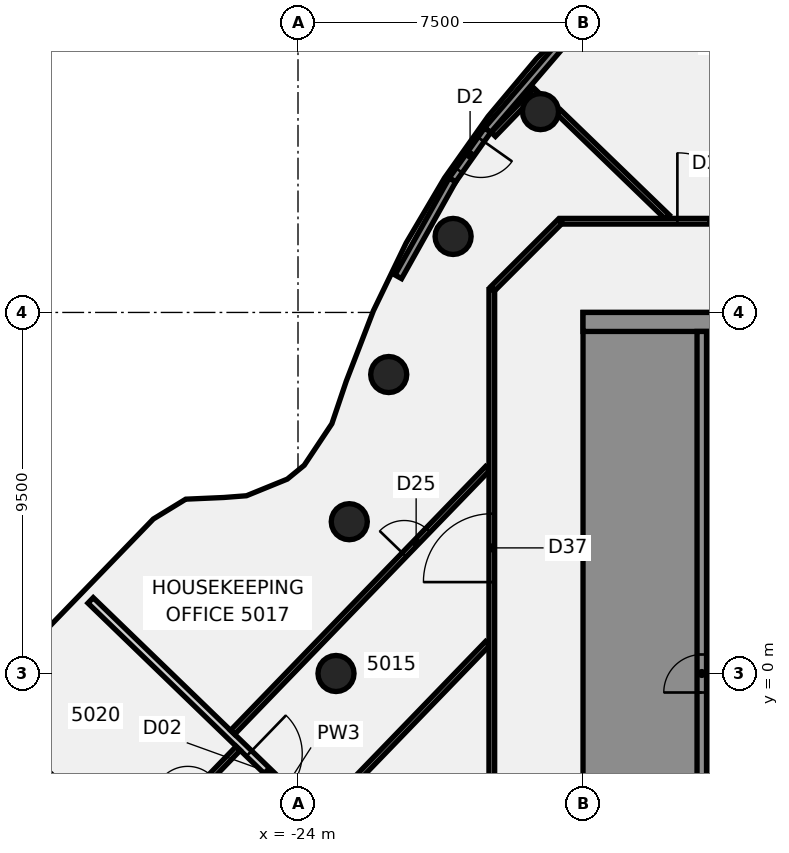
"""IFC4 building model, lengths in metres.
Left out: names, types, materials, properties, quantities, classifications, styles, units other than length and angle.
Written with IfcOpenShell. Run it as: python <this file> out.ifc"""

import sys

from ifc_helpers import new_model, si_unit, direction, frame, frame_2d, origin, origin_2d, place, context, subcontext, project, spatial, polyline, rectangle, circle, outline, extrude, element, fill, save


model = new_model("IFC4")
c1 = context("Model", 3, precision=1e-05, world=origin(), true_north=direction((0.0, 1.0)))
c2 = subcontext(c1, "Body", "Model", "MODEL_VIEW")
j1 = project(units=[si_unit("LENGTHUNIT", "METRE"), si_unit("PLANEANGLEUNIT", "RADIAN")], contexts=[c1])
p1 = place(None, origin())
s1 = spatial("IfcSite", under=j1, at=p1, CompositionType="ELEMENT")
p2 = place(p1, origin())
s2 = spatial("IfcBuilding", under=s1, at=p2, CompositionType="ELEMENT")
p3 = place(p2, frame((0.0, 0.0, 200.5)))
s3 = spatial("IfcBuildingStorey", under=s2, at=p3, CompositionType="ELEMENT", Elevation=200.5)
for number, where, z_axis, x_axis in (
    (1, (-17.619, 14.784, -0.14), (0.0, 0.0, 1.0), (1.0, 0.0, 0.0)),
    (2, (-19.919, 11.5, -0.14), (0.0, 0.0, 1.0), (1.0, 0.0, 0.0)),
    (3, (-21.613, 7.866, -0.14), (0.0, 0.0, 1.0), (1.0, 0.0, 0.0)),
    (4, (-22.651, 3.994, -0.14), (0.0, 0.0, 1.0), (1.0, 0.0, 0.0)),
    (5, (-23.0, 0.0, -0.14), (0.0, 0.0, 1.0), (1.0, 0.0, 0.0)),
):
    element("IfcColumn", number, at=place(p3, frame(where, z_axis=z_axis, x_axis=x_axis)), inside=s3, PredefinedType="COLUMN", context=c2, shape_type="SweptSolid", body=[
        extrude(circle(Radius=0.475, at=origin_2d()), origin(), (0.0, 0.0, 1.0), 3.6),
    ])
p4 = place(p3, frame((-29.458, 1.924, 0.0), z_axis=(0.0, 0.0, 1.0), x_axis=(0.719015546542, -0.694993988342, 0.0)))
e6 = element("IfcWall", 6, at=p4, inside=s3, PredefinedType="PARTITIONING", context=c2, shape_type="SweptSolid", body=[
    extrude(rectangle(XDim=14.219, YDim=0.2, at=frame_2d((7.109, 0.0))), origin(), (0.0, 0.0, 1.0), 2.864),
])
p5 = place(p4, frame((5.799, 0.0, 0.0)))
e7 = element("IfcOpeningElement", 7, at=p5, cuts=e6, PredefinedType="OPENING", context=c2, shape_type="SweptSolid", body=[
    extrude(rectangle(XDim=1.4, YDim=2.1, at=frame_2d((0.7, 1.05))), frame((0.0, 0.11, 0.0), z_axis=(0.0, -1.0, 0.0), x_axis=(1.0, 0.0, 0.0)), (0.0, 0.0, 1.0), 0.22),
])
p6 = place(p3, frame((-17.137, 14.771, 0.0), z_axis=(0.0, 0.0, 1.0), x_axis=(0.719023191533, -0.694986079025, 0.0)))
e8 = element("IfcWall", 8, at=p6, inside=s3, PredefinedType="PARTITIONING", context=c2, shape_type="SweptSolid", body=[
    extrude(rectangle(XDim=3.971, YDim=0.15, at=frame_2d((1.986, 0.0))), origin(), (0.0, 0.0, 1.0), 2.864),
])
p7 = place(p3, frame((-17.065, 11.9, 0.0), z_axis=(0.0, 0.0, 1.0), x_axis=(1.0, 0.0, 0.0)))
e9 = element("IfcWall", 9, at=p7, inside=s3, PredefinedType="PARTITIONING", context=c2, shape_type="SweptSolid", body=[
    extrude(rectangle(XDim=34.165, YDim=0.15, at=frame_2d((17.083, 0.0))), origin(), (0.0, 0.0, 1.0), 2.864),
])
p8 = place(p7, frame((24.372, 0.0, 0.0)))
e10 = element("IfcOpeningElement", 10, at=p8, cuts=e9, PredefinedType="OPENING", context=c2, shape_type="SweptSolid", body=[
    extrude(rectangle(XDim=1.8, YDim=2.1, at=frame_2d((0.9, 1.05))), frame((0.0, 0.085, 0.0), z_axis=(0.0, -1.0, 0.0), x_axis=(1.0, 0.0, 0.0)), (0.0, 0.0, 1.0), 0.17),
])
p9 = place(p7, frame((8.898, 0.0, 0.0)))
e11 = element("IfcOpeningElement", 11, at=p9, cuts=e9, PredefinedType="OPENING", context=c2, shape_type="SweptSolid", body=[
    extrude(rectangle(XDim=1.8, YDim=2.1, at=frame_2d((0.9, 1.05))), frame((0.0, 0.085, 0.0), z_axis=(0.0, -1.0, 0.0), x_axis=(1.0, 0.0, 0.0)), (0.0, 0.0, 1.0), 0.17),
])
p10 = place(p7, frame((3.048, 0.0, 0.0)))
e12 = element("IfcOpeningElement", 12, at=p10, cuts=e9, PredefinedType="OPENING", context=c2, shape_type="SweptSolid", body=[
    extrude(rectangle(XDim=1.8, YDim=2.1, at=frame_2d((0.9, 1.05))), frame((0.0, 0.085, 0.0), z_axis=(0.0, -1.0, 0.0), x_axis=(1.0, 0.0, 0.0)), (0.0, 0.0, 1.0), 0.17),
])
p11 = place(p3, frame((-18.872, 10.128, 0.0), z_axis=(0.0, 0.0, 1.0), x_axis=(0.707106781187, 0.707106781187, 0.0)))
e13 = element("IfcWall", 13, at=p11, inside=s3, PredefinedType="PARTITIONING", context=c2, shape_type="SweptSolid", body=[
    extrude(rectangle(XDim=2.505, YDim=0.15, at=frame_2d((1.253, 0.0))), origin(), (0.0, 0.0, 1.0), 2.864),
])
p12 = place(p3, frame((-28.256, -4.745, 0.0), z_axis=(0.0, 0.0, 1.0), x_axis=(0.69501991717, 0.718990483064, 0.0)))
e14 = element("IfcWall", 14, at=p12, inside=s3, PredefinedType="PARTITIONING", context=c2, shape_type="SweptSolid", body=[
    extrude(rectangle(XDim=3.86, YDim=0.15, at=frame_2d((1.93, 0.0))), origin(), (0.0, 0.0, 1.0), 2.864),
])
p13 = place(p12, frame((1.95, 0.0, 0.0)))
e15 = element("IfcOpeningElement", 15, at=p13, cuts=e14, PredefinedType="OPENING", context=c2, shape_type="SweptSolid", body=[
    extrude(rectangle(XDim=0.9, YDim=2.1, at=frame_2d((0.45, 1.05))), frame((0.0, 0.085, 0.0), z_axis=(0.0, -1.0, 0.0), x_axis=(1.0, 0.0, 0.0)), (0.0, 0.0, 1.0), 0.17),
])
p14 = place(p3, frame((-25.721, -1.548, 0.0), z_axis=(0.0, 0.0, 1.0), x_axis=(0.694993774498, 0.719015753241, 0.0)))
e16 = element("IfcWall", 16, at=p14, inside=s3, PredefinedType="PARTITIONING", context=c2, shape_type="SweptSolid", body=[
    extrude(rectangle(XDim=9.655, YDim=0.15, at=frame_2d((4.828, 0.0))), origin(), (0.0, 0.0, 1.0), 2.864),
])
p15 = place(p14, frame((6.5, 0.0, 0.0)))
e17 = element("IfcOpeningElement", 17, at=p15, cuts=e16, PredefinedType="OPENING", context=c2, shape_type="SweptSolid", body=[
    extrude(rectangle(XDim=0.9, YDim=2.1, at=frame_2d((0.45, 1.05))), frame((0.0, 0.085, 0.0), z_axis=(0.0, -1.0, 0.0), x_axis=(1.0, 0.0, 0.0)), (0.0, 0.0, 1.0), 0.17),
])
p16 = place(p3, frame((-23.408, -3.758, 0.0), z_axis=(0.0, 0.0, 1.0), x_axis=(0.69504071857, 0.718970374584, 0.0)))
e18 = element("IfcWall", 18, at=p16, inside=s3, PredefinedType="PARTITIONING", context=c2, shape_type="SweptSolid", body=[
    extrude(rectangle(XDim=6.325, YDim=0.15, at=frame_2d((3.163, 0.0))), origin(), (0.0, 0.0, 1.0), 2.864),
])
p17 = place(p3, frame((-18.859, 14.184, 0.0), z_axis=(0.0, 0.0, 1.0), x_axis=(0.695170193183, 0.718845186747, 0.0)))
e19 = element("IfcWall", 19, at=p17, inside=s3, PredefinedType="PARTITIONING", context=c2, shape_type="SweptSolid", body=[
    extrude(rectangle(XDim=1.619, YDim=0.15, at=frame_2d((0.81, 0.0))), origin(), (0.0, 0.0, 1.0), 2.864),
])
p18 = place(p3, frame((-18.9, -10.1, 0.0), z_axis=(0.0, 0.0, 1.0), x_axis=(0.0, 1.0, 0.0)))
e20 = element("IfcWall", 20, at=p18, inside=s3, PredefinedType="PARTITIONING", context=c2, shape_type="SweptSolid", body=[
    extrude(rectangle(XDim=20.2, YDim=0.15, at=frame_2d((10.1, 0.0))), origin(), (0.0, 0.0, 1.0), 2.864),
])
p19 = place(p18, frame((12.505, 0.0, 0.0)))
e21 = element("IfcOpeningElement", 21, at=p19, cuts=e20, PredefinedType="OPENING", context=c2, shape_type="SweptSolid", body=[
    extrude(rectangle(XDim=1.8, YDim=2.1, at=frame_2d((0.9, 1.05))), frame((0.0, 0.085, 0.0), z_axis=(0.0, -1.0, 0.0), x_axis=(1.0, 0.0, 0.0)), (0.0, 0.0, 1.0), 0.17),
])
p20 = place(p18, frame((5.072, 0.0, 0.0)))
e22 = element("IfcOpeningElement", 22, at=p20, cuts=e20, PredefinedType="OPENING", context=c2, shape_type="SweptSolid", body=[
    extrude(rectangle(XDim=0.9, YDim=2.1, at=frame_2d((0.45, 1.05))), frame((0.0, 0.085, 0.0), z_axis=(0.0, -1.0, 0.0), x_axis=(1.0, 0.0, 0.0)), (0.0, 0.0, 1.0), 0.17),
])
p21 = place(p3, frame((-17.106, 16.516, 0.0), z_axis=(0.0, 0.0, 1.0), x_axis=(-0.651107622301, -0.758985417635, 0.0)))
e23 = element("IfcWall", 23, at=p21, inside=s3, PredefinedType="SOLIDWALL", context=c2, shape_type="SweptSolid", body=[
    extrude(rectangle(XDim=2.924, YDim=0.2, at=frame_2d((1.462, 0.0))), origin(), (0.0, 0.0, 1.0), 3.46),
])
p22 = place(p3, frame((-19.934, 12.99, 0.0), z_axis=(0.0, 0.0, 1.0), x_axis=(-0.488305904859, -0.872672529234, 0.0)))
e24 = element("IfcWall", 24, at=p22, inside=s3, PredefinedType="SOLIDWALL", context=c2, shape_type="SweptSolid", body=[
    extrude(rectangle(XDim=2.924, YDim=0.2, at=frame_2d((1.462, 0.0))), origin(), (0.0, 0.0, 1.0), 3.46),
])
p23 = place(p3, frame((-19.01, 14.296, 0.0), z_axis=(0.0, 0.0, 1.0), x_axis=(-0.577623490405, -0.816303315767, 0.0)))
e25 = element("IfcWall", 25, at=p23, inside=s3, PredefinedType="SOLIDWALL", context=c2, shape_type="SweptSolid", body=[
    extrude(rectangle(XDim=1.6, YDim=0.2, at=frame_2d((0.8, 0.0))), origin(), (0.0, 0.0, 1.0), 3.46),
])
p24 = place(p23, frame((0.3, 0.0, 0.0)))
e26 = element("IfcOpeningElement", 26, at=p24, cuts=e25, PredefinedType="OPENING", context=c2, shape_type="SweptSolid", body=[
    extrude(rectangle(XDim=1.0, YDim=2.4, at=frame_2d((0.5, 1.2))), frame((0.0, 0.11, 0.0), z_axis=(0.0, -1.0, 0.0), x_axis=(1.0, 0.0, 0.0)), (0.0, 0.0, 1.0), 0.22),
])
p25 = place(p3, origin())
e27 = element("IfcWall", 27, at=p25, inside=s3, PredefinedType="SHEAR", context=c2, shape_type="SweptSolid", body=[
    extrude(outline(polyline([(-13.5, -8.125), (-16.0, -8.125), (-16.0, -5.625), (-13.5, -5.625), (-13.5, -5.375), (-16.0, -5.375), (-16.0, 5.375), (-13.5, 5.375), (-13.5, 5.625), (-16.0, 5.625), (-16.0, 8.125), (-13.5, 8.125), (-13.5, 9.0), (-16.0, 9.0), (-16.5, 9.0), (-16.5, -9.0), (-16.0, -9.0), (-13.5, -9.0), (-13.5, -8.125)])), origin(), (0.0, 0.0, 1.0), 3.46),
])
p26 = place(p3, frame((-16.5, 9.25, 0.0), z_axis=(0.0, 0.0, 1.0), x_axis=(1.0, 0.0, 0.0)))
e28 = element("IfcWall", 28, at=p26, inside=s3, PredefinedType="SHEAR", context=c2, shape_type="SweptSolid", body=[
    extrude(rectangle(XDim=13.0, YDim=0.5, at=frame_2d((6.5, 0.0))), origin(), (0.0, 0.0, 1.0), 3.46),
])
p27 = place(p3, frame((-13.375, -9.0, 0.0), z_axis=(0.0, 0.0, 1.0), x_axis=(0.0, 1.0, 0.0)))
e29 = element("IfcWall", 29, at=p27, inside=s3, PredefinedType="SHEAR", context=c2, shape_type="SweptSolid", body=[
    extrude(rectangle(XDim=18.0, YDim=0.25, at=frame_2d((9.0, 0.0))), origin(), (0.0, 0.0, 1.0), 3.46),
])
p28 = place(p27, frame((1.425, 0.0, 0.0)))
e30 = element("IfcOpeningElement", 30, at=p28, cuts=e29, PredefinedType="OPENING", context=c2, shape_type="SweptSolid", body=[
    extrude(rectangle(XDim=1.4, YDim=2.1, at=frame_2d((0.7, 1.05))), frame((0.0, 0.135, 0.0), z_axis=(0.0, -1.0, 0.0), x_axis=(1.0, 0.0, 0.0)), (0.0, 0.0, 1.0), 0.27),
])
p29 = place(p27, frame((8.5, 0.0, 0.0)))
e31 = element("IfcOpeningElement", 31, at=p29, cuts=e29, PredefinedType="OPENING", context=c2, shape_type="SweptSolid", body=[
    extrude(rectangle(XDim=1.0, YDim=2.1, at=frame_2d((0.5, 1.05))), frame((0.0, 0.135, 0.0), z_axis=(0.0, -1.0, 0.0), x_axis=(1.0, 0.0, 0.0)), (0.0, 0.0, 1.0), 0.27),
])
p30 = place(p3, frame((-30.798, -2.483, -0.14), z_axis=(0.0, 0.0, 1.0), x_axis=(0.718983292765, -0.695027355379, 0.0)))
e32 = element("IfcWall", 32, at=p30, inside=s3, PredefinedType="SHEAR", context=c2, shape_type="SweptSolid", body=[
    extrude(rectangle(XDim=3.2, YDim=0.2, at=frame_2d((1.6, 0.0))), origin(), (0.0, 0.0, 1.0), 3.004),
])
p31 = place(p5, origin())
e33 = element("IfcDoor", 33, at=p31, inside=s3, OperationType="DOUBLE_DOOR_SINGLE_SWING", PredefinedType="DOOR", context=c2, shape_type="SweptSolid", body=[
    extrude(rectangle(XDim=1.4, YDim=2.1, at=frame_2d((0.7, 1.05))), frame((0.0, 0.025, 0.0), z_axis=(0.0, -1.0, 0.0), x_axis=(1.0, 0.0, 0.0)), (0.0, 0.0, 1.0), 0.05),
])
fill(e7, e33)
p32 = place(p10, origin())
e34 = element("IfcDoor", 34, at=p32, inside=s3, OperationType="DOUBLE_DOOR_SINGLE_SWING", PredefinedType="DOOR", context=c2, shape_type="SweptSolid", body=[
    extrude(rectangle(XDim=1.8, YDim=2.1, at=frame_2d((0.9, 1.05))), frame((0.0, 0.025, 0.0), z_axis=(0.0, -1.0, 0.0), x_axis=(1.0, 0.0, 0.0)), (0.0, 0.0, 1.0), 0.05),
])
fill(e12, e34)
p33 = place(p15, origin())
e35 = element("IfcDoor", 35, at=p33, inside=s3, OperationType="SINGLE_SWING_LEFT", PredefinedType="DOOR", context=c2, shape_type="SweptSolid", body=[
    extrude(rectangle(XDim=0.9, YDim=2.1, at=frame_2d((0.45, 1.05))), frame((0.0, 0.025, 0.0), z_axis=(0.0, -1.0, 0.0), x_axis=(1.0, 0.0, 0.0)), (0.0, 0.0, 1.0), 0.05),
])
fill(e17, e35)
p34 = place(p19, frame((1.8, 0.0, 0.0), z_axis=(0.0, 0.0, 1.0), x_axis=(-1.0, 0.0, 0.0)))
e36 = element("IfcDoor", 36, at=p34, inside=s3, OperationType="DOUBLE_DOOR_SINGLE_SWING", PredefinedType="DOOR", context=c2, shape_type="SweptSolid", body=[
    extrude(rectangle(XDim=1.8, YDim=2.1, at=frame_2d((0.9, 1.05))), frame((0.0, 0.025, 0.0), z_axis=(0.0, -1.0, 0.0), x_axis=(1.0, 0.0, 0.0)), (0.0, 0.0, 1.0), 0.05),
])
fill(e21, e36)
p35 = place(p24, origin())
e37 = element("IfcDoor", 37, at=p35, inside=s3, OperationType="SINGLE_SWING_LEFT", PredefinedType="DOOR", context=c2, shape_type="SweptSolid", body=[
    extrude(rectangle(XDim=1.0, YDim=2.4, at=frame_2d((0.5, 1.2))), frame((0.0, 0.025, 0.0), z_axis=(0.0, -1.0, 0.0), x_axis=(1.0, 0.0, 0.0)), (0.0, 0.0, 1.0), 0.05),
])
fill(e26, e37)
p36 = place(p29, origin())
e38 = element("IfcDoor", 38, at=p36, inside=s3, OperationType="SINGLE_SWING_LEFT", PredefinedType="DOOR", context=c2, shape_type="SweptSolid", body=[
    extrude(rectangle(XDim=1.0, YDim=2.1, at=frame_2d((0.5, 1.05))), frame((0.0, 0.025, 0.0), z_axis=(0.0, -1.0, 0.0), x_axis=(1.0, 0.0, 0.0)), (0.0, 0.0, 1.0), 0.05),
])
fill(e31, e38)
save(model, sys.argv[1])
